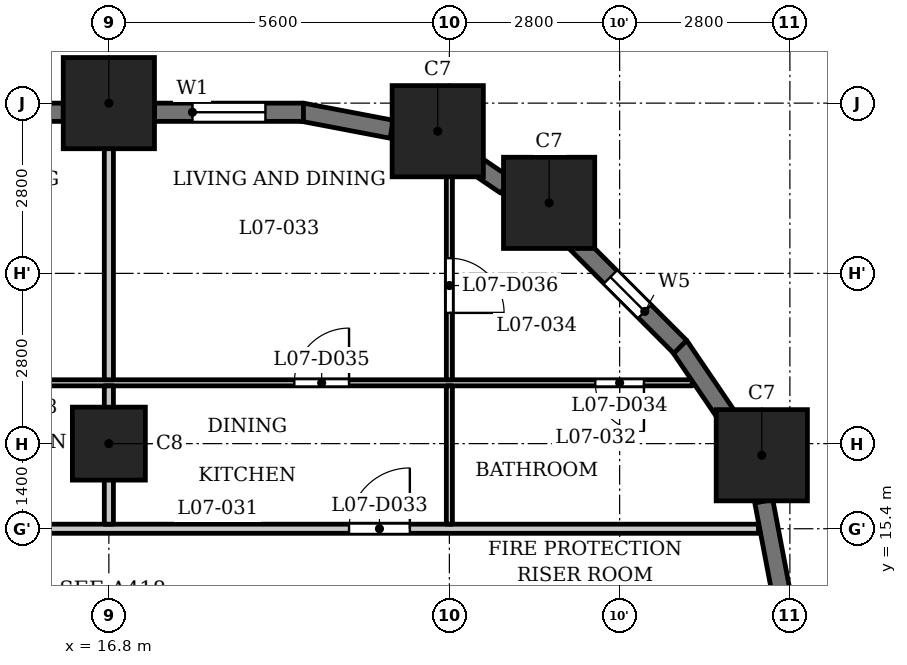
"""IFC4 building model, lengths in metres.
Left out: names, types, materials, properties, quantities, classifications, styles, units other than length and angle.
Written with IfcOpenShell. Run it as: python <this file> out.ifc"""

import sys

from ifc_helpers import new_model, si_unit, direction, frame, frame_2d, origin, origin_2d, place, context, subcontext, project, spatial, rectangle, extrude, element, fill, save


model = new_model("IFC4")
c1 = context("Model", 3, precision=1e-05, world=origin(), true_north=direction((0.0, 1.0)))
c2 = subcontext(c1, "Body", "Model", "MODEL_VIEW")
j1 = project(units=[si_unit("LENGTHUNIT", "METRE"), si_unit("PLANEANGLEUNIT", "RADIAN")], contexts=[c1])
p1 = place(None, origin())
s1 = spatial("IfcSite", under=j1, at=p1, CompositionType="ELEMENT")
p2 = place(p1, origin())
s2 = spatial("IfcBuilding", under=s1, at=p2, CompositionType="ELEMENT")
p3 = place(p2, frame((0.0, 0.0, 34.0)))
s3 = spatial("IfcBuildingStorey", under=s2, at=p3, CompositionType="ELEMENT", Elevation=34.0)
for number, where, z_axis, x_axis in (
    (1, (27.538, 16.609, 0.0), (0.0, 0.0, 1.0), (1.0, 0.0, 0.0)),
    (2, (24.04, 20.76, 0.0), (0.0, 0.0, 1.0), (1.0, 0.0, 0.0)),
    (3, (22.209, 21.938, 0.0), (0.0, 0.0, 1.0), (1.0, 0.0, 0.0)),
    (4, (16.8, 22.4, 0.0), (0.0, 0.0, 1.0), (1.0, 0.0, 0.0)),
):
    element("IfcColumn", number, at=place(p3, frame(where, z_axis=z_axis, x_axis=x_axis)), inside=s3, PredefinedType="COLUMN", context=c2, shape_type="SweptSolid", body=[
        extrude(rectangle(XDim=1.5, YDim=1.5, at=origin_2d()), origin(), (0.0, 0.0, 1.0), 3.5),
    ])
p4 = place(p3, frame((16.8, 16.8, 0.0), z_axis=(0.0, 0.0, 1.0), x_axis=(1.0, 0.0, 0.0)))
e5 = element("IfcColumn", 5, at=p4, inside=s3, PredefinedType="COLUMN", context=c2, shape_type="SweptSolid", body=[
    extrude(rectangle(XDim=1.2, YDim=1.2, at=origin_2d()), origin(), (0.0, 0.0, 1.0), 3.5),
])
for number, where, z_axis, x_axis in (
    (6, (27.853, 14.372, 0.0), (0.0, 0.0, 1.0), (-0.187, 0.982, 0.0)),
    (7, (27.025, 17.167, 0.0), (0.0, 0.0, 1.0), (-0.562, 0.827, 0.0)),
):
    element("IfcWall", number, at=place(p3, frame(where, z_axis=z_axis, x_axis=x_axis)), inside=s3, PredefinedType="SOLIDWALL", context=c2, shape_type="SweptSolid", body=[
        extrude(rectangle(XDim=1.506, YDim=0.3, at=frame_2d((0.753, 0.0))), origin(), (0.0, 0.0, 1.0), 2.35),
    ])
p5 = place(p3, frame((26.197, 18.391, 0.0), z_axis=(0.0, 0.0, 1.0), x_axis=(-0.707106781187, 0.707106781187, 0.0)))
e8 = element("IfcWall", 8, at=p5, inside=s3, PredefinedType="SOLIDWALL", context=c2, shape_type="SweptSolid", body=[
    extrude(rectangle(XDim=2.45, YDim=0.3, at=frame_2d((1.225, 0.0))), origin(), (0.0, 0.0, 1.0), 2.35),
])
p6 = place(p5, frame((0.825, 0.0, 0.6)))
e9 = element("IfcOpeningElement", 9, at=p6, cuts=e8, PredefinedType="OPENING", context=c2, shape_type="SweptSolid", body=[
    extrude(rectangle(XDim=0.8, YDim=1.55, at=frame_2d((0.4, 0.775))), frame((0.0, 0.16, 0.0), z_axis=(0.0, -1.0, 0.0), x_axis=(1.0, 0.0, 0.0)), (0.0, 0.0, 1.0), 0.32),
])
p7 = place(p3, frame((23.327, 21.045, 0.0), z_axis=(0.0, 0.0, 1.0), x_axis=(-0.827080706709, 0.562083182981, 0.0)))
e10 = element("IfcWall", 10, at=p7, inside=s3, PredefinedType="SOLIDWALL", context=c2, shape_type="SweptSolid", body=[
    extrude(rectangle(XDim=0.677, YDim=0.3, at=frame_2d((0.339, 0.0))), origin(), (0.0, 0.0, 1.0), 3.2),
])
p8 = place(p3, frame((21.451, 21.97, 0.0), z_axis=(0.0, 0.0, 1.0), x_axis=(-0.982287454367, 0.187380247071, 0.0)))
e11 = element("IfcWall", 11, at=p8, inside=s3, PredefinedType="SOLIDWALL", context=c2, shape_type="SweptSolid", body=[
    extrude(rectangle(XDim=1.506, YDim=0.3, at=frame_2d((0.753, 0.0))), origin(), (0.0, 0.0, 1.0), 2.35),
])
p9 = place(p3, frame((20.0, 22.25, 0.0), z_axis=(0.0, 0.0, 1.0), x_axis=(-1.0, 0.0, 0.0)))
e12 = element("IfcWall", 12, at=p9, inside=s3, PredefinedType="SOLIDWALL", context=c2, shape_type="SweptSolid", body=[
    extrude(rectangle(XDim=2.45, YDim=0.3, at=frame_2d((1.225, 0.0))), origin(), (0.0, 0.0, 1.0), 2.35),
])
p10 = place(p9, frame((0.625, 0.0, 0.6)))
e13 = element("IfcOpeningElement", 13, at=p10, cuts=e12, PredefinedType="OPENING", context=c2, shape_type="SweptSolid", body=[
    extrude(rectangle(XDim=1.2, YDim=1.55, at=frame_2d((0.6, 0.775))), frame((0.0, 0.16, 0.0), z_axis=(0.0, -1.0, 0.0), x_axis=(1.0, 0.0, 0.0)), (0.0, 0.0, 1.0), 0.32),
])
p11 = place(p3, frame((16.05, 22.25, 0.0), z_axis=(0.0, 0.0, 1.0), x_axis=(-1.0, 0.0, 0.0)))
e14 = element("IfcWall", 14, at=p11, inside=s3, PredefinedType="SOLIDWALL", context=c2, shape_type="SweptSolid", body=[
    extrude(rectangle(XDim=4.1, YDim=0.3, at=frame_2d((2.05, 0.0))), origin(), (0.0, 0.0, 1.0), 2.35),
])
p12 = place(p11, frame((0.25, 0.0, 1.2)))
e15 = element("IfcOpeningElement", 15, at=p12, cuts=e14, PredefinedType="OPENING", context=c2, shape_type="SweptSolid", body=[
    extrude(rectangle(XDim=3.6, YDim=0.95, at=frame_2d((1.8, 0.475))), frame((0.0, 0.16, 0.0), z_axis=(0.0, -1.0, 0.0), x_axis=(1.0, 0.0, 0.0)), (0.0, 0.0, 1.0), 0.32),
])
p13 = place(p3, frame((-27.484, 15.4, 0.0), z_axis=(0.0, 0.0, 1.0), x_axis=(1.0, 0.0, 0.0)))
e16 = element("IfcWall", 16, at=p13, inside=s3, PredefinedType="PARTITIONING", context=c2, shape_type="SweptSolid", body=[
    extrude(rectangle(XDim=54.968, YDim=0.15, at=frame_2d((27.484, 0.0))), origin(), (0.0, 0.0, 1.0), 3.2),
])
p14 = place(p13, frame((8.784, 0.0, 0.0)))
e17 = element("IfcOpeningElement", 17, at=p14, cuts=e16, PredefinedType="OPENING", context=c2, shape_type="SweptSolid", body=[
    extrude(rectangle(XDim=1.0, YDim=2.1, at=frame_2d((0.5, 1.05))), frame((0.0, 0.085, 0.0), z_axis=(0.0, -1.0, 0.0), x_axis=(1.0, 0.0, 0.0)), (0.0, 0.0, 1.0), 0.17),
])
p15 = place(p13, frame((14.634, 0.0, 0.0)))
e18 = element("IfcOpeningElement", 18, at=p15, cuts=e16, PredefinedType="OPENING", context=c2, shape_type="SweptSolid", body=[
    extrude(rectangle(XDim=1.0, YDim=2.1, at=frame_2d((0.5, 1.05))), frame((0.0, 0.085, 0.0), z_axis=(0.0, -1.0, 0.0), x_axis=(1.0, 0.0, 0.0)), (0.0, 0.0, 1.0), 0.17),
])
p16 = place(p13, frame((23.834, 0.0, 0.0)))
e19 = element("IfcOpeningElement", 19, at=p16, cuts=e16, PredefinedType="OPENING", context=c2, shape_type="SweptSolid", body=[
    extrude(rectangle(XDim=1.0, YDim=2.1, at=frame_2d((0.5, 1.05))), frame((0.0, 0.085, 0.0), z_axis=(0.0, -1.0, 0.0), x_axis=(1.0, 0.0, 0.0)), (0.0, 0.0, 1.0), 0.17),
])
p17 = place(p13, frame((28.184, 0.0, 0.0)))
e20 = element("IfcOpeningElement", 20, at=p17, cuts=e16, PredefinedType="OPENING", context=c2, shape_type="SweptSolid", body=[
    extrude(rectangle(XDim=1.0, YDim=2.1, at=frame_2d((0.5, 1.05))), frame((0.0, 0.085, 0.0), z_axis=(0.0, -1.0, 0.0), x_axis=(1.0, 0.0, 0.0)), (0.0, 0.0, 1.0), 0.17),
])
p18 = place(p13, frame((41.884, 0.0, 0.0)))
e21 = element("IfcOpeningElement", 21, at=p18, cuts=e16, PredefinedType="OPENING", context=c2, shape_type="SweptSolid", body=[
    extrude(rectangle(XDim=1.0, YDim=2.1, at=frame_2d((0.5, 1.05))), frame((0.0, 0.085, 0.0), z_axis=(0.0, -1.0, 0.0), x_axis=(1.0, 0.0, 0.0)), (0.0, 0.0, 1.0), 0.17),
])
p19 = place(p13, frame((48.234, 0.0, 0.0)))
e22 = element("IfcOpeningElement", 22, at=p19, cuts=e16, PredefinedType="OPENING", context=c2, shape_type="SweptSolid", body=[
    extrude(rectangle(XDim=1.0, YDim=2.1, at=frame_2d((0.5, 1.05))), frame((0.0, 0.085, 0.0), z_axis=(0.0, -1.0, 0.0), x_axis=(1.0, 0.0, 0.0)), (0.0, 0.0, 1.0), 0.17),
])
p20 = place(p3, frame((-26.732, 17.8, 0.0), z_axis=(0.0, 0.0, 1.0), x_axis=(1.0, 0.0, 0.0)))
e23 = element("IfcWall", 23, at=p20, inside=s3, PredefinedType="PARTITIONING", context=c2, shape_type="SweptSolid", body=[
    extrude(rectangle(XDim=53.126, YDim=0.1, at=frame_2d((26.563, 0.0))), origin(), (0.0, 0.0, 1.0), 3.2),
])
p21 = place(p20, frame((2.964, 0.0, 0.0)))
e24 = element("IfcOpeningElement", 24, at=p21, cuts=e23, PredefinedType="OPENING", context=c2, shape_type="SweptSolid", body=[
    extrude(rectangle(XDim=0.8, YDim=2.1, at=frame_2d((0.4, 1.05))), frame((0.0, 0.06, 0.0), z_axis=(0.0, -1.0, 0.0), x_axis=(1.0, 0.0, 0.0)), (0.0, 0.0, 1.0), 0.12),
])
p22 = place(p20, frame((7.132, 0.0, 0.0)))
e25 = element("IfcOpeningElement", 25, at=p22, cuts=e23, PredefinedType="OPENING", context=c2, shape_type="SweptSolid", body=[
    extrude(rectangle(XDim=0.9, YDim=2.1, at=frame_2d((0.45, 1.05))), frame((0.0, 0.06, 0.0), z_axis=(0.0, -1.0, 0.0), x_axis=(1.0, 0.0, 0.0)), (0.0, 0.0, 1.0), 0.12),
])
p23 = place(p20, frame((19.432, 0.0, 0.0)))
e26 = element("IfcOpeningElement", 26, at=p23, cuts=e23, PredefinedType="OPENING", context=c2, shape_type="SweptSolid", body=[
    extrude(rectangle(XDim=0.8, YDim=2.1, at=frame_2d((0.4, 1.05))), frame((0.0, 0.06, 0.0), z_axis=(0.0, -1.0, 0.0), x_axis=(1.0, 0.0, 0.0)), (0.0, 0.0, 1.0), 0.12),
])
p24 = place(p20, frame((16.732, 0.0, 0.0)))
e27 = element("IfcOpeningElement", 27, at=p24, cuts=e23, PredefinedType="OPENING", context=c2, shape_type="SweptSolid", body=[
    extrude(rectangle(XDim=0.9, YDim=2.1, at=frame_2d((0.45, 1.05))), frame((0.0, 0.06, 0.0), z_axis=(0.0, -1.0, 0.0), x_axis=(1.0, 0.0, 0.0)), (0.0, 0.0, 1.0), 0.12),
])
p25 = place(p20, frame((10.982, 0.0, 0.0)))
e28 = element("IfcOpeningElement", 28, at=p25, cuts=e23, PredefinedType="OPENING", context=c2, shape_type="SweptSolid", body=[
    extrude(rectangle(XDim=0.9, YDim=2.1, at=frame_2d((0.45, 1.05))), frame((0.0, 0.06, 0.0), z_axis=(0.0, -1.0, 0.0), x_axis=(1.0, 0.0, 0.0)), (0.0, 0.0, 1.0), 0.12),
])
p26 = place(p20, frame((12.982, 0.0, 0.0)))
e29 = element("IfcOpeningElement", 29, at=p26, cuts=e23, PredefinedType="OPENING", context=c2, shape_type="SweptSolid", body=[
    extrude(rectangle(XDim=0.9, YDim=2.1, at=frame_2d((0.45, 1.05))), frame((0.0, 0.06, 0.0), z_axis=(0.0, -1.0, 0.0), x_axis=(1.0, 0.0, 0.0)), (0.0, 0.0, 1.0), 0.12),
])
p27 = place(p20, frame((25.382, 0.0, 0.0)))
e30 = element("IfcOpeningElement", 30, at=p27, cuts=e23, PredefinedType="OPENING", context=c2, shape_type="SweptSolid", body=[
    extrude(rectangle(XDim=0.8, YDim=2.1, at=frame_2d((0.4, 1.05))), frame((0.0, 0.06, 0.0), z_axis=(0.0, -1.0, 0.0), x_axis=(1.0, 0.0, 0.0)), (0.0, 0.0, 1.0), 0.12),
])
p28 = place(p20, frame((22.182, 0.0, 0.0)))
e31 = element("IfcOpeningElement", 31, at=p28, cuts=e23, PredefinedType="OPENING", context=c2, shape_type="SweptSolid", body=[
    extrude(rectangle(XDim=0.9, YDim=2.1, at=frame_2d((0.45, 1.05))), frame((0.0, 0.06, 0.0), z_axis=(0.0, -1.0, 0.0), x_axis=(1.0, 0.0, 0.0)), (0.0, 0.0, 1.0), 0.12),
])
p29 = place(p20, frame((36.232, 0.0, 0.0)))
e32 = element("IfcOpeningElement", 32, at=p29, cuts=e23, PredefinedType="OPENING", context=c2, shape_type="SweptSolid", body=[
    extrude(rectangle(XDim=0.8, YDim=2.1, at=frame_2d((0.4, 1.05))), frame((0.0, 0.06, 0.0), z_axis=(0.0, -1.0, 0.0), x_axis=(1.0, 0.0, 0.0)), (0.0, 0.0, 1.0), 0.12),
])
p30 = place(p20, frame((33.782, 0.0, 0.0)))
e33 = element("IfcOpeningElement", 33, at=p30, cuts=e23, PredefinedType="OPENING", context=c2, shape_type="SweptSolid", body=[
    extrude(rectangle(XDim=0.9, YDim=2.1, at=frame_2d((0.45, 1.05))), frame((0.0, 0.06, 0.0), z_axis=(0.0, -1.0, 0.0), x_axis=(1.0, 0.0, 0.0)), (0.0, 0.0, 1.0), 0.12),
])
p31 = place(p20, frame((27.282, 0.0, 0.0)))
e34 = element("IfcOpeningElement", 34, at=p31, cuts=e23, PredefinedType="OPENING", context=c2, shape_type="SweptSolid", body=[
    extrude(rectangle(XDim=0.9, YDim=2.1, at=frame_2d((0.45, 1.05))), frame((0.0, 0.06, 0.0), z_axis=(0.0, -1.0, 0.0), x_axis=(1.0, 0.0, 0.0)), (0.0, 0.0, 1.0), 0.12),
])
p32 = place(p20, frame((30.282, 0.0, 0.0)))
e35 = element("IfcOpeningElement", 35, at=p32, cuts=e23, PredefinedType="OPENING", context=c2, shape_type="SweptSolid", body=[
    extrude(rectangle(XDim=0.9, YDim=2.1, at=frame_2d((0.45, 1.05))), frame((0.0, 0.06, 0.0), z_axis=(0.0, -1.0, 0.0), x_axis=(1.0, 0.0, 0.0)), (0.0, 0.0, 1.0), 0.12),
])
p33 = place(p20, frame((38.582, 0.0, 0.0)))
e36 = element("IfcOpeningElement", 36, at=p33, cuts=e23, PredefinedType="OPENING", context=c2, shape_type="SweptSolid", body=[
    extrude(rectangle(XDim=0.8, YDim=2.1, at=frame_2d((0.4, 1.05))), frame((0.0, 0.06, 0.0), z_axis=(0.0, -1.0, 0.0), x_axis=(1.0, 0.0, 0.0)), (0.0, 0.0, 1.0), 0.12),
])
p34 = place(p20, frame((41.232, 0.0, 0.0)))
e37 = element("IfcOpeningElement", 37, at=p34, cuts=e23, PredefinedType="OPENING", context=c2, shape_type="SweptSolid", body=[
    extrude(rectangle(XDim=0.9, YDim=2.1, at=frame_2d((0.45, 1.05))), frame((0.0, 0.06, 0.0), z_axis=(0.0, -1.0, 0.0), x_axis=(1.0, 0.0, 0.0)), (0.0, 0.0, 1.0), 0.12),
])
p35 = place(p20, frame((51.532, 0.0, 0.0)))
e38 = element("IfcOpeningElement", 38, at=p35, cuts=e23, PredefinedType="OPENING", context=c2, shape_type="SweptSolid", body=[
    extrude(rectangle(XDim=0.8, YDim=2.1, at=frame_2d((0.4, 1.05))), frame((0.0, 0.06, 0.0), z_axis=(0.0, -1.0, 0.0), x_axis=(1.0, 0.0, 0.0)), (0.0, 0.0, 1.0), 0.12),
])
p36 = place(p20, frame((46.582, 0.0, 0.0)))
e39 = element("IfcOpeningElement", 39, at=p36, cuts=e23, PredefinedType="OPENING", context=c2, shape_type="SweptSolid", body=[
    extrude(rectangle(XDim=0.9, YDim=2.1, at=frame_2d((0.45, 1.05))), frame((0.0, 0.06, 0.0), z_axis=(0.0, -1.0, 0.0), x_axis=(1.0, 0.0, 0.0)), (0.0, 0.0, 1.0), 0.12),
])
p37 = place(p3, frame((16.8, 15.475, 0.0), z_axis=(0.0, 0.0, 1.0), x_axis=(0.0, 1.0, 0.0)))
e40 = element("IfcWall", 40, at=p37, inside=s3, PredefinedType="PARTITIONING", context=c2, shape_type="SweptSolid", body=[
    extrude(rectangle(XDim=2.275, YDim=0.15, at=frame_2d((1.137, 0.0))), origin(), (0.0, 0.0, 1.0), 3.2),
])
p38 = place(p3, frame((16.8, 17.85, 0.0), z_axis=(0.0, 0.0, 1.0), x_axis=(0.0, 1.0, 0.0)))
e41 = element("IfcWall", 41, at=p38, inside=s3, PredefinedType="PARTITIONING", context=c2, shape_type="SweptSolid", body=[
    extrude(rectangle(XDim=5.28, YDim=0.15, at=frame_2d((2.64, 0.0))), origin(), (0.0, 0.0, 1.0), 3.2),
])
p39 = place(p3, frame((22.4, 15.475, 0.0), z_axis=(0.0, 0.0, 1.0), x_axis=(0.0, 1.0, 0.0)))
e42 = element("IfcWall", 42, at=p39, inside=s3, PredefinedType="PARTITIONING", context=c2, shape_type="SweptSolid", body=[
    extrude(rectangle(XDim=2.275, YDim=0.1, at=frame_2d((1.137, 0.0))), origin(), (0.0, 0.0, 1.0), 3.2),
])
p40 = place(p3, frame((22.4, 17.85, 0.0), z_axis=(0.0, 0.0, 1.0), x_axis=(0.0, 1.0, 0.0)))
e43 = element("IfcWall", 43, at=p40, inside=s3, PredefinedType="PARTITIONING", context=c2, shape_type="SweptSolid", body=[
    extrude(rectangle(XDim=3.87, YDim=0.1, at=frame_2d((1.935, 0.0))), origin(), (0.0, 0.0, 1.0), 3.2),
])
p41 = place(p40, frame((1.1, 0.0, 0.0)))
e44 = element("IfcOpeningElement", 44, at=p41, cuts=e43, PredefinedType="OPENING", context=c2, shape_type="SweptSolid", body=[
    extrude(rectangle(XDim=0.9, YDim=2.1, at=frame_2d((0.45, 1.05))), frame((0.0, 0.06, 0.0), z_axis=(0.0, -1.0, 0.0), x_axis=(1.0, 0.0, 0.0)), (0.0, 0.0, 1.0), 0.12),
])
p42 = place(p19, origin())
e45 = element("IfcDoor", 45, at=p42, inside=s3, OperationType="SINGLE_SWING_LEFT", PredefinedType="DOOR", context=c2, shape_type="SweptSolid", body=[
    extrude(rectangle(XDim=1.0, YDim=2.1, at=frame_2d((0.5, 1.05))), frame((0.0, 0.025, 0.0), z_axis=(0.0, -1.0, 0.0), x_axis=(1.0, 0.0, 0.0)), (0.0, 0.0, 1.0), 0.05),
])
fill(e22, e45)
p43 = place(p35, origin())
e46 = element("IfcDoor", 46, at=p43, inside=s3, OperationType="SINGLE_SWING_RIGHT", PredefinedType="DOOR", context=c2, shape_type="SweptSolid", body=[
    extrude(rectangle(XDim=0.8, YDim=2.1, at=frame_2d((0.4, 1.05))), frame((0.0, 0.025, 0.0), z_axis=(0.0, -1.0, 0.0), x_axis=(1.0, 0.0, 0.0)), (0.0, 0.0, 1.0), 0.05),
])
fill(e38, e46)
p44 = place(p36, origin())
e47 = element("IfcDoor", 47, at=p44, inside=s3, OperationType="SINGLE_SWING_LEFT", PredefinedType="DOOR", context=c2, shape_type="SweptSolid", body=[
    extrude(rectangle(XDim=0.9, YDim=2.1, at=frame_2d((0.45, 1.05))), frame((0.0, 0.025, 0.0), z_axis=(0.0, -1.0, 0.0), x_axis=(1.0, 0.0, 0.0)), (0.0, 0.0, 1.0), 0.05),
])
fill(e39, e47)
p45 = place(p41, origin())
e48 = element("IfcDoor", 48, at=p45, inside=s3, OperationType="SINGLE_SWING_LEFT", PredefinedType="DOOR", context=c2, shape_type="SweptSolid", body=[
    extrude(rectangle(XDim=0.9, YDim=2.1, at=frame_2d((0.45, 1.05))), frame((0.0, 0.025, 0.0), z_axis=(0.0, -1.0, 0.0), x_axis=(1.0, 0.0, 0.0)), (0.0, 0.0, 1.0), 0.05),
])
fill(e44, e48)
p46 = place(p6, origin())
e49 = element("IfcWindow", 49, at=p46, inside=s3, PartitioningType="SINGLE_PANEL", PredefinedType="WINDOW", context=c2, shape_type="SweptSolid", body=[
    extrude(rectangle(XDim=0.8, YDim=1.55, at=frame_2d((0.4, 0.775))), frame((0.0, 0.03, 0.0), z_axis=(0.0, -1.0, 0.0), x_axis=(1.0, 0.0, 0.0)), (0.0, 0.0, 1.0), 0.06),
])
fill(e9, e49)
p47 = place(p10, origin())
e50 = element("IfcWindow", 50, at=p47, inside=s3, PartitioningType="SINGLE_PANEL", PredefinedType="WINDOW", context=c2, shape_type="SweptSolid", body=[
    extrude(rectangle(XDim=1.2, YDim=1.55, at=frame_2d((0.6, 0.775))), frame((0.0, 0.03, 0.0), z_axis=(0.0, -1.0, 0.0), x_axis=(1.0, 0.0, 0.0)), (0.0, 0.0, 1.0), 0.06),
])
fill(e13, e50)
save(model, sys.argv[1])
